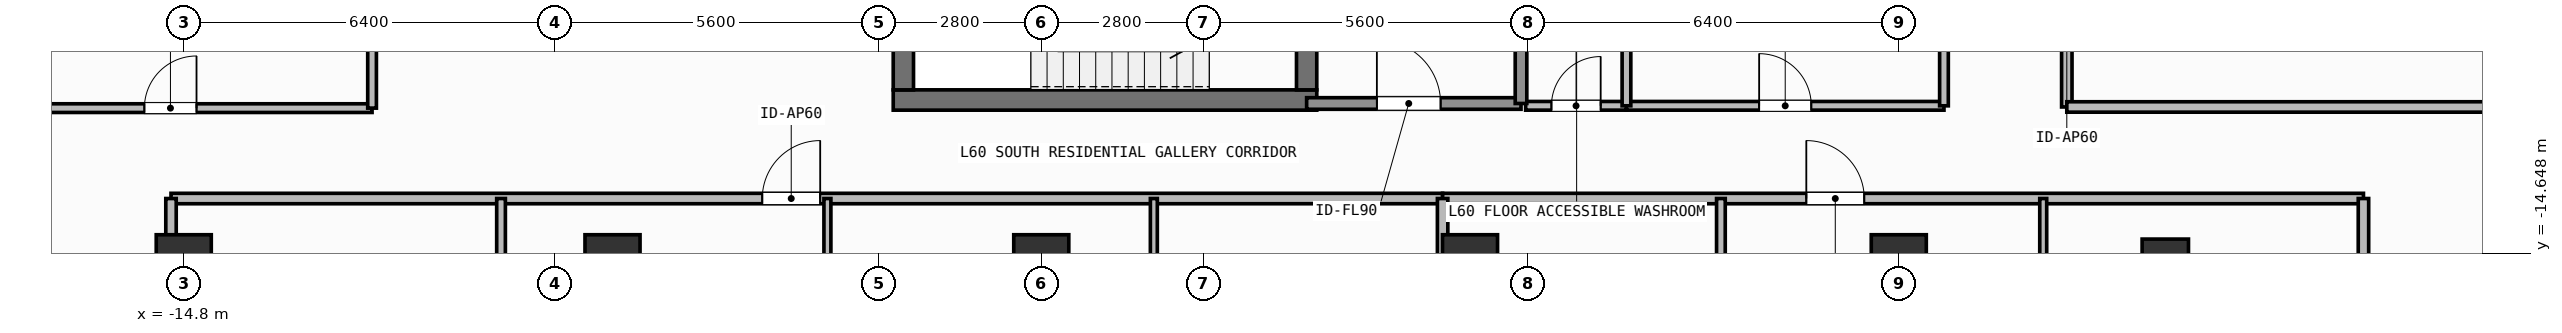
"""IFC4 building model, lengths in metres.
Left out: names, types, materials, properties, quantities, classifications, styles, units other than length and angle.
Written with IfcOpenShell. Run it as: python <this file> out.ifc"""

import sys

from ifc_helpers import new_model, si_unit, direction, frame, frame_2d, origin, origin_2d, place, context, subcontext, project, spatial, rectangle, hollow_rectangle, extrude, element, fill, save


model = new_model("IFC4")
c1 = context("Model", 3, precision=1e-05, world=origin(), true_north=direction((0.0, 1.0)))
c2 = subcontext(c1, "Body", "Model", "MODEL_VIEW")
j1 = project(units=[si_unit("LENGTHUNIT", "METRE"), si_unit("PLANEANGLEUNIT", "RADIAN")], contexts=[c1])
p1 = place(None, origin())
s1 = spatial("IfcSite", under=j1, at=p1, CompositionType="ELEMENT")
p2 = place(p1, origin())
s2 = spatial("IfcBuilding", under=s1, at=p2, CompositionType="ELEMENT")
p3 = place(p2, frame((0.0, 0.0, 246.9)))
s3 = spatial("IfcBuildingStorey", under=s2, at=p3, CompositionType="ELEMENT", Elevation=246.9)
p4 = place(p3, frame((-2.555, -12.0, 0.0), z_axis=(0.0, 0.0, 1.0), x_axis=(1.0, 0.0, 0.0)))
e1 = element("IfcWall", 1, at=p4, inside=s3, PredefinedType="SHEAR", context=c2, shape_type="SweptSolid", body=[
    extrude(rectangle(XDim=7.31, YDim=0.35, at=frame_2d((3.655, 0.0))), origin(), (0.0, 0.0, 1.0), 3.9),
])
p5 = place(p3, frame((-2.38, -11.825, 0.0), z_axis=(0.0, 0.0, 1.0), x_axis=(0.0, 1.0, 0.0)))
e2 = element("IfcWall", 2, at=p5, inside=s3, PredefinedType="SHEAR", context=c2, shape_type="SweptSolid", body=[
    extrude(rectangle(XDim=2.925, YDim=0.35, at=frame_2d((1.462, 0.0))), origin(), (0.0, 0.0, 1.0), 3.9),
])
p6 = place(p3, frame((4.58, -8.9, 0.0), z_axis=(0.0, 0.0, 1.0), x_axis=(0.0, -1.0, 0.0)))
e3 = element("IfcWall", 3, at=p6, inside=s3, PredefinedType="SHEAR", context=c2, shape_type="SweptSolid", body=[
    extrude(rectangle(XDim=2.925, YDim=0.35, at=frame_2d((1.462, 0.0))), origin(), (0.0, 0.0, 1.0), 3.9),
])
p7 = place(p6, frame((0.913, 0.0, 0.0)))
e4 = element("IfcOpeningElement", 4, at=p7, cuts=e3, PredefinedType="OPENING", context=c2, shape_type="SweptSolid", body=[
    extrude(rectangle(XDim=1.1, YDim=2.15, at=frame_2d((0.55, 1.075))), frame((0.0, 0.185, 0.0), z_axis=(0.0, -1.0, 0.0), x_axis=(1.0, 0.0, 0.0)), (0.0, 0.0, 1.0), 0.37),
])
for number, where, z_axis, x_axis in (
    (5, (-14.8, -14.8, 0.0), (0.0, 0.0, 1.0), (1.0, 0.0, 0.0)),
    (6, (-7.4, -14.8, 0.0), (0.0, 0.0, 1.0), (1.0, 0.0, 0.0)),
    (7, (0.0, -14.8, 0.0), (0.0, 0.0, 1.0), (1.0, 0.0, 0.0)),
    (8, (7.4, -14.8, 0.0), (0.0, 0.0, 1.0), (1.0, 0.0, 0.0)),
    (9, (14.8, -14.8, 0.0), (0.0, 0.0, 1.0), (1.0, 0.0, 0.0)),
):
    element("IfcColumn", number, at=place(p3, frame(where, z_axis=z_axis, x_axis=x_axis)), inside=s3, PredefinedType="COLUMN", context=c2, shape_type="SweptSolid", body=[
        extrude(rectangle(XDim=0.95, YDim=0.95, at=origin_2d()), origin(), (0.0, 0.0, 1.0), 3.9),
    ])
p8 = place(p3, frame((19.4, -14.8, 0.0), z_axis=(0.0, 0.0, 1.0), x_axis=(1.0, 0.0, 0.0)))
e10 = element("IfcColumn", 10, at=p8, inside=s3, PredefinedType="COLUMN", context=c2, shape_type="SweptSolid", body=[
    extrude(hollow_rectangle(XDim=0.8, YDim=0.8, WallThickness=0.036, at=origin_2d()), origin(), (0.0, 0.0, 1.0), 3.9),
])
p9 = place(p3, frame((4.58, -12.06, 0.0), z_axis=(0.0, 0.0, 1.0), x_axis=(1.0, 0.0, 0.0)))
e11 = element("IfcWall", 11, at=p9, inside=s3, PredefinedType="SOLIDWALL", context=c2, shape_type="SweptSolid", body=[
    extrude(rectangle(XDim=3.7, YDim=0.2, at=frame_2d((1.85, 0.0))), origin(), (0.0, 0.0, 1.0), 3.68),
])
p10 = place(p9, frame((1.212, 0.0, 0.0)))
e12 = element("IfcOpeningElement", 12, at=p10, cuts=e11, PredefinedType="OPENING", context=c2, shape_type="SweptSolid", body=[
    extrude(rectangle(XDim=1.1, YDim=2.15, at=frame_2d((0.55, 1.075))), frame((0.0, 0.11, 0.0), z_axis=(0.0, -1.0, 0.0), x_axis=(1.0, 0.0, 0.0)), (0.0, 0.0, 1.0), 0.22),
])
p11 = place(p3, frame((8.36, -12.1, 0.0), z_axis=(0.0, 0.0, 1.0), x_axis=(1.0, 0.0, 0.0)))
e13 = element("IfcWall", 13, at=p11, inside=s3, PredefinedType="PARTITIONING", context=c2, shape_type="SweptSolid", body=[
    extrude(rectangle(XDim=1.74, YDim=0.15, at=frame_2d((0.87, 0.0))), origin(), (0.0, 0.0, 1.0), 3.68),
])
p12 = place(p11, frame((0.445, 0.0, 0.0)))
e14 = element("IfcOpeningElement", 14, at=p12, cuts=e13, PredefinedType="OPENING", context=c2, shape_type="SweptSolid", body=[
    extrude(rectangle(XDim=0.85, YDim=2.1, at=frame_2d((0.425, 1.05))), frame((0.0, 0.085, 0.0), z_axis=(0.0, -1.0, 0.0), x_axis=(1.0, 0.0, 0.0)), (0.0, 0.0, 1.0), 0.17),
])
p13 = place(p3, frame((10.1, -12.1, 0.0), z_axis=(0.0, 0.0, 1.0), x_axis=(1.0, 0.0, 0.0)))
e15 = element("IfcWall", 15, at=p13, inside=s3, PredefinedType="PARTITIONING", context=c2, shape_type="SweptSolid", body=[
    extrude(rectangle(XDim=5.48, YDim=0.15, at=frame_2d((2.74, 0.0))), origin(), (0.0, 0.0, 1.0), 3.68),
])
p14 = place(p13, frame((2.29, 0.0, 0.0)))
e16 = element("IfcOpeningElement", 16, at=p14, cuts=e15, PredefinedType="OPENING", context=c2, shape_type="SweptSolid", body=[
    extrude(rectangle(XDim=0.9, YDim=2.1, at=frame_2d((0.45, 1.05))), frame((0.0, 0.085, 0.0), z_axis=(0.0, -1.0, 0.0), x_axis=(1.0, 0.0, 0.0)), (0.0, 0.0, 1.0), 0.17),
])
p15 = place(p3, frame((-15.02, -13.7, 0.0), z_axis=(0.0, 0.0, 1.0), x_axis=(1.0, 0.0, 0.0)))
e17 = element("IfcWall", 17, at=p15, inside=s3, PredefinedType="PARTITIONING", context=c2, shape_type="SweptSolid", body=[
    extrude(rectangle(XDim=21.947, YDim=0.18, at=frame_2d((10.974, 0.0))), origin(), (0.0, 0.0, 1.0), 3.68),
])
p16 = place(p15, frame((10.205, 0.0, 0.0)))
e18 = element("IfcOpeningElement", 18, at=p16, cuts=e17, PredefinedType="OPENING", context=c2, shape_type="SweptSolid", body=[
    extrude(rectangle(XDim=1.0, YDim=2.2, at=frame_2d((0.5, 1.1))), frame((0.0, 0.1, 0.0), z_axis=(0.0, -1.0, 0.0), x_axis=(1.0, 0.0, 0.0)), (0.0, 0.0, 1.0), 0.2),
])
p17 = place(p3, frame((-3.691, -24.39, 0.0), z_axis=(0.0, 0.0, 1.0), x_axis=(0.0, 1.0, 0.0)))
e19 = element("IfcWall", 19, at=p17, inside=s3, PredefinedType="PARTITIONING", context=c2, shape_type="SweptSolid", body=[
    extrude(rectangle(XDim=10.69, YDim=0.12, at=frame_2d((5.345, 0.0))), origin(), (0.0, 0.0, 1.0), 3.68),
])
p18 = place(p17, frame((4.806, 0.0, 0.0)))
e20 = element("IfcOpeningElement", 20, at=p18, cuts=e19, PredefinedType="OPENING", context=c2, shape_type="SweptSolid", body=[
    extrude(rectangle(XDim=0.9, YDim=2.1, at=frame_2d((0.45, 1.05))), frame((0.0, 0.07, 0.0), z_axis=(0.0, -1.0, 0.0), x_axis=(1.0, 0.0, 0.0)), (0.0, 0.0, 1.0), 0.14),
])
p19 = place(p3, frame((-9.324, -18.421, 0.0), z_axis=(0.0, 0.0, 1.0), x_axis=(0.0, 1.0, 0.0)))
e21 = element("IfcWall", 21, at=p19, inside=s3, PredefinedType="PARTITIONING", context=c2, shape_type="SweptSolid", body=[
    extrude(rectangle(XDim=4.721, YDim=0.15, at=frame_2d((2.36, 0.0))), origin(), (0.0, 0.0, 1.0), 3.68),
])
p20 = place(p19, frame((1.936, 0.0, 0.0)))
e22 = element("IfcOpeningElement", 22, at=p20, cuts=e21, PredefinedType="OPENING", context=c2, shape_type="SweptSolid", body=[
    extrude(rectangle(XDim=0.85, YDim=2.1, at=frame_2d((0.425, 1.05))), frame((0.0, 0.085, 0.0), z_axis=(0.0, -1.0, 0.0), x_axis=(1.0, 0.0, 0.0)), (0.0, 0.0, 1.0), 0.17),
])
p21 = place(p3, frame((1.943, -18.19, 0.0), z_axis=(0.0, 0.0, 1.0), x_axis=(0.0, 1.0, 0.0)))
e23 = element("IfcWall", 23, at=p21, inside=s3, PredefinedType="PARTITIONING", context=c2, shape_type="SweptSolid", body=[
    extrude(rectangle(XDim=4.49, YDim=0.12, at=frame_2d((2.245, 0.0))), origin(), (0.0, 0.0, 1.0), 3.68),
])
p22 = place(p21, frame((1.907, 0.0, 0.0)))
e24 = element("IfcOpeningElement", 24, at=p22, cuts=e23, PredefinedType="OPENING", context=c2, shape_type="SweptSolid", body=[
    extrude(rectangle(XDim=0.85, YDim=2.1, at=frame_2d((0.425, 1.05))), frame((0.0, 0.07, 0.0), z_axis=(0.0, -1.0, 0.0), x_axis=(1.0, 0.0, 0.0)), (0.0, 0.0, 1.0), 0.14),
])
p23 = place(p3, frame((6.927, -13.7, 0.0), z_axis=(0.0, 0.0, 1.0), x_axis=(1.0, 0.0, 0.0)))
e25 = element("IfcWall", 25, at=p23, inside=s3, PredefinedType="PARTITIONING", context=c2, shape_type="SweptSolid", body=[
    extrude(rectangle(XDim=15.893, YDim=0.18, at=frame_2d((7.947, 0.0))), origin(), (0.0, 0.0, 1.0), 3.68),
])
p24 = place(p23, frame((6.277, 0.0, 0.0)))
e26 = element("IfcOpeningElement", 26, at=p24, cuts=e25, PredefinedType="OPENING", context=c2, shape_type="SweptSolid", body=[
    extrude(rectangle(XDim=1.0, YDim=2.2, at=frame_2d((0.5, 1.1))), frame((0.0, 0.1, 0.0), z_axis=(0.0, -1.0, 0.0), x_axis=(1.0, 0.0, 0.0)), (0.0, 0.0, 1.0), 0.2),
])
p25 = place(p3, frame((11.73, -18.19, 0.0), z_axis=(0.0, 0.0, 1.0), x_axis=(0.0, 1.0, 0.0)))
e27 = element("IfcWall", 27, at=p25, inside=s3, PredefinedType="PARTITIONING", context=c2, shape_type="SweptSolid", body=[
    extrude(rectangle(XDim=4.49, YDim=0.15, at=frame_2d((2.245, 0.0))), origin(), (0.0, 0.0, 1.0), 3.68),
])
p26 = place(p25, frame((1.907, 0.0, 0.0)))
e28 = element("IfcOpeningElement", 28, at=p26, cuts=e27, PredefinedType="OPENING", context=c2, shape_type="SweptSolid", body=[
    extrude(rectangle(XDim=0.85, YDim=2.1, at=frame_2d((0.425, 1.05))), frame((0.0, 0.085, 0.0), z_axis=(0.0, -1.0, 0.0), x_axis=(1.0, 0.0, 0.0)), (0.0, 0.0, 1.0), 0.17),
])
p27 = place(p3, frame((17.293, -18.19, 0.0), z_axis=(0.0, 0.0, 1.0), x_axis=(0.0, 1.0, 0.0)))
e29 = element("IfcWall", 29, at=p27, inside=s3, PredefinedType="PARTITIONING", context=c2, shape_type="SweptSolid", body=[
    extrude(rectangle(XDim=4.49, YDim=0.12, at=frame_2d((2.245, 0.0))), origin(), (0.0, 0.0, 1.0), 3.68),
])
p28 = place(p27, frame((1.907, 0.0, 0.0)))
e30 = element("IfcOpeningElement", 30, at=p28, cuts=e29, PredefinedType="OPENING", context=c2, shape_type="SweptSolid", body=[
    extrude(rectangle(XDim=0.85, YDim=2.1, at=frame_2d((0.425, 1.05))), frame((0.0, 0.07, 0.0), z_axis=(0.0, -1.0, 0.0), x_axis=(1.0, 0.0, 0.0)), (0.0, 0.0, 1.0), 0.14),
])
p29 = place(p3, frame((-18.33, -12.14, 0.0), z_axis=(0.0, 0.0, 1.0), x_axis=(1.0, 0.0, 0.0)))
e31 = element("IfcWall", 31, at=p29, inside=s3, PredefinedType="PARTITIONING", context=c2, shape_type="SweptSolid", body=[
    extrude(rectangle(XDim=6.78, YDim=0.15, at=frame_2d((3.39, 0.0))), origin(), (0.0, 0.0, 1.0), 3.68),
])
p30 = place(p29, frame((2.85, 0.0, 0.0)))
e32 = element("IfcOpeningElement", 32, at=p30, cuts=e31, PredefinedType="OPENING", context=c2, shape_type="SweptSolid", body=[
    extrude(rectangle(XDim=0.9, YDim=2.1, at=frame_2d((0.45, 1.05))), frame((0.0, 0.085, 0.0), z_axis=(0.0, -1.0, 0.0), x_axis=(1.0, 0.0, 0.0)), (0.0, 0.0, 1.0), 0.17),
])
p31 = place(p3, frame((17.7, -12.12, 0.0), z_axis=(0.0, 0.0, 1.0), x_axis=(0.0, 1.0, 0.0)))
e33 = element("IfcWall", 33, at=p31, inside=s3, PredefinedType="PARTITIONING", context=c2, shape_type="SweptSolid", body=[
    extrude(rectangle(XDim=8.98, YDim=0.18, at=frame_2d((4.49, 0.0))), origin(), (0.0, 0.0, 1.0), 3.68),
])
p32 = place(p31, frame((1.407, 0.0, 0.0)))
e34 = element("IfcOpeningElement", 34, at=p32, cuts=e33, PredefinedType="OPENING", context=c2, shape_type="SweptSolid", body=[
    extrude(rectangle(XDim=1.0, YDim=2.2, at=frame_2d((0.5, 1.1))), frame((0.0, 0.1, 0.0), z_axis=(0.0, -1.0, 0.0), x_axis=(1.0, 0.0, 0.0)), (0.0, 0.0, 1.0), 0.2),
])
p33 = place(p3, frame((8.28, -12.06, 0.0), z_axis=(0.0, 0.0, 1.0), x_axis=(0.0, 1.0, 0.0)))
e35 = element("IfcWall", 35, at=p33, inside=s3, PredefinedType="SOLIDWALL", context=c2, shape_type="SweptSolid", body=[
    extrude(rectangle(XDim=3.335, YDim=0.2, at=frame_2d((1.667, 0.0))), origin(), (0.0, 0.0, 1.0), 3.68),
])
p34 = place(p3, frame((10.1, -12.1, 0.0), z_axis=(0.0, 0.0, 1.0), x_axis=(0.0, 1.0, 0.0)))
e36 = element("IfcWall", 36, at=p34, inside=s3, PredefinedType="PARTITIONING", context=c2, shape_type="SweptSolid", body=[
    extrude(rectangle(XDim=2.35, YDim=0.15, at=frame_2d((1.175, 0.0))), origin(), (0.0, 0.0, 1.0), 3.68),
])
p35 = place(p3, frame((15.58, -12.1, 0.0), z_axis=(0.0, 0.0, 1.0), x_axis=(0.0, 1.0, 0.0)))
e37 = element("IfcWall", 37, at=p35, inside=s3, PredefinedType="PARTITIONING", context=c2, shape_type="SweptSolid", body=[
    extrude(rectangle(XDim=6.25, YDim=0.15, at=frame_2d((3.125, 0.0))), origin(), (0.0, 0.0, 1.0), 3.68),
])
p36 = place(p3, frame((6.927, -28.63, 0.0), z_axis=(0.0, 0.0, 1.0), x_axis=(0.0, 1.0, 0.0)))
e38 = element("IfcWall", 38, at=p36, inside=s3, PredefinedType="PARTITIONING", context=c2, shape_type="SweptSolid", body=[
    extrude(rectangle(XDim=14.93, YDim=0.18, at=frame_2d((7.465, 0.0))), origin(), (0.0, 0.0, 1.0), 3.68),
])
for number, where, z_axis, x_axis in (
    (39, (-15.02, -27.51, 0.0), (0.0, 0.0, 1.0), (0.0, 1.0, 0.0)),
    (40, (22.82, -27.51, 0.0), (0.0, 0.0, 1.0), (0.0, 1.0, 0.0)),
):
    element("IfcWall", number, at=place(p3, frame(where, z_axis=z_axis, x_axis=x_axis)), inside=s3, PredefinedType="PARTITIONING", context=c2, shape_type="SweptSolid", body=[
        extrude(rectangle(XDim=13.81, YDim=0.18, at=frame_2d((6.905, 0.0))), origin(), (0.0, 0.0, 1.0), 3.68),
    ])
p37 = place(p3, frame((-11.55, -12.14, 0.0), z_axis=(0.0, 0.0, 1.0), x_axis=(0.0, 1.0, 0.0)))
e41 = element("IfcWall", 41, at=p37, inside=s3, PredefinedType="PARTITIONING", context=c2, shape_type="SweptSolid", body=[
    extrude(rectangle(XDim=15.09, YDim=0.15, at=frame_2d((7.545, 0.0))), origin(), (0.0, 0.0, 1.0), 3.68),
])
p38 = place(p3, frame((17.7, -12.12, 0.0), z_axis=(0.0, 0.0, 1.0), x_axis=(1.0, 0.0, 0.0)))
e42 = element("IfcWall", 42, at=p38, inside=s3, PredefinedType="PARTITIONING", context=c2, shape_type="SweptSolid", body=[
    extrude(rectangle(XDim=8.43, YDim=0.18, at=frame_2d((4.215, 0.0))), origin(), (0.0, 0.0, 1.0), 3.68),
])
p39 = place(p10, origin())
e43 = element("IfcDoor", 43, at=p39, inside=s3, OperationType="SINGLE_SWING_LEFT", PredefinedType="DOOR", context=c2, shape_type="SweptSolid", body=[
    extrude(rectangle(XDim=1.1, YDim=2.15, at=frame_2d((0.55, 1.075))), frame((0.0, 0.025, 0.0), z_axis=(0.0, -1.0, 0.0), x_axis=(1.0, 0.0, 0.0)), (0.0, 0.0, 1.0), 0.05),
])
fill(e12, e43)
p40 = place(p12, origin())
e44 = element("IfcDoor", 44, at=p40, inside=s3, OperationType="SINGLE_SWING_RIGHT", PredefinedType="DOOR", context=c2, shape_type="SweptSolid", body=[
    extrude(rectangle(XDim=0.85, YDim=2.1, at=frame_2d((0.425, 1.05))), frame((0.0, 0.025, 0.0), z_axis=(0.0, -1.0, 0.0), x_axis=(1.0, 0.0, 0.0)), (0.0, 0.0, 1.0), 0.05),
])
fill(e14, e44)
p41 = place(p14, origin())
e45 = element("IfcDoor", 45, at=p41, inside=s3, OperationType="SINGLE_SWING_LEFT", PredefinedType="DOOR", context=c2, shape_type="SweptSolid", body=[
    extrude(rectangle(XDim=0.9, YDim=2.1, at=frame_2d((0.45, 1.05))), frame((0.0, 0.025, 0.0), z_axis=(0.0, -1.0, 0.0), x_axis=(1.0, 0.0, 0.0)), (0.0, 0.0, 1.0), 0.05),
])
fill(e16, e45)
p42 = place(p16, origin())
e46 = element("IfcDoor", 46, at=p42, inside=s3, OperationType="SINGLE_SWING_RIGHT", PredefinedType="DOOR", context=c2, shape_type="SweptSolid", body=[
    extrude(rectangle(XDim=1.0, YDim=2.2, at=frame_2d((0.5, 1.1))), frame((0.0, 0.025, 0.0), z_axis=(0.0, -1.0, 0.0), x_axis=(1.0, 0.0, 0.0)), (0.0, 0.0, 1.0), 0.05),
])
fill(e18, e46)
p43 = place(p24, origin())
e47 = element("IfcDoor", 47, at=p43, inside=s3, OperationType="SINGLE_SWING_LEFT", PredefinedType="DOOR", context=c2, shape_type="SweptSolid", body=[
    extrude(rectangle(XDim=1.0, YDim=2.2, at=frame_2d((0.5, 1.1))), frame((0.0, 0.025, 0.0), z_axis=(0.0, -1.0, 0.0), x_axis=(1.0, 0.0, 0.0)), (0.0, 0.0, 1.0), 0.05),
])
fill(e26, e47)
p44 = place(p30, origin())
e48 = element("IfcDoor", 48, at=p44, inside=s3, OperationType="SINGLE_SWING_RIGHT", PredefinedType="DOOR", context=c2, shape_type="SweptSolid", body=[
    extrude(rectangle(XDim=0.9, YDim=2.1, at=frame_2d((0.45, 1.05))), frame((0.0, 0.025, 0.0), z_axis=(0.0, -1.0, 0.0), x_axis=(1.0, 0.0, 0.0)), (0.0, 0.0, 1.0), 0.05),
])
fill(e32, e48)
save(model, sys.argv[1])
